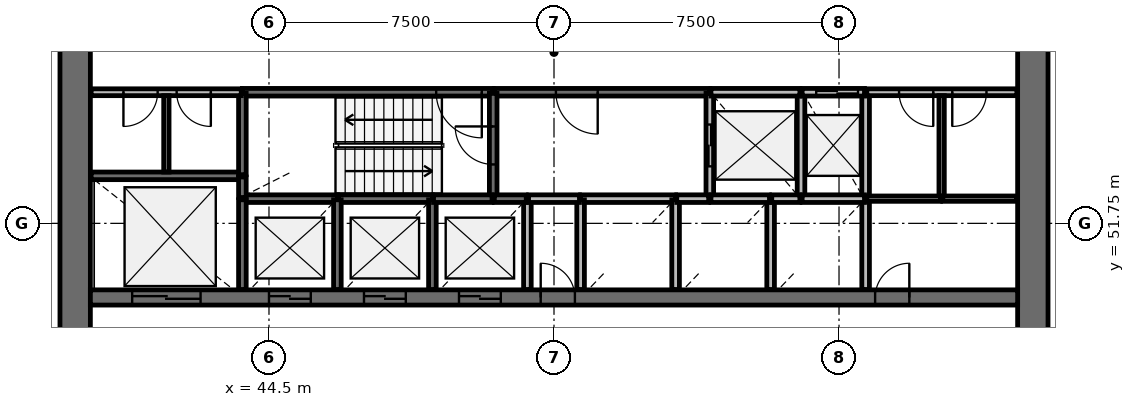
"""IFC4 building model, lengths in metres.
Left out: names, types, materials, properties, quantities, classifications, styles, units other than length and angle.
Written with IfcOpenShell. Run it as: python <this file> out.ifc"""

import sys

from ifc_helpers import new_model, si_unit, direction, frame, frame_2d, origin, place, context, subcontext, project, spatial, rectangle, extrude, source, transform, mapped, element, fill, save


model = new_model("IFC4")
c1 = context("Model", 3, precision=1e-05, world=origin(), true_north=direction((0.0, 1.0)))
c2 = subcontext(c1, "Body", "Model", "MODEL_VIEW")
j1 = project(units=[si_unit("LENGTHUNIT", "METRE"), si_unit("PLANEANGLEUNIT", "RADIAN")], contexts=[c1])
p1 = place(None, origin())
s1 = spatial("IfcSite", under=j1, at=p1, CompositionType="ELEMENT")
p2 = place(p1, origin())
s2 = spatial("IfcBuilding", under=s1, at=p2, CompositionType="ELEMENT")
p3 = place(p2, frame((0.0, 0.0, 108.5)))
s3 = spatial("IfcBuildingStorey", under=s2, at=p3, CompositionType="ELEMENT", Elevation=108.5)
p4 = place(p3, frame((64.6, 38.0, 0.0), z_axis=(0.0, 0.0, 1.0), x_axis=(0.0, 1.0, 0.0)))
e1 = element("IfcWall", 1, at=p4, inside=s3, PredefinedType="SHEAR", context=c2, shape_type="SweptSolid", body=[
    extrude(rectangle(XDim=20.0, YDim=0.8, at=frame_2d((10.0, 0.0))), origin(), (0.0, 0.0, 1.0), 4.1),
])
p5 = place(p4, frame((9.1, 0.0, 0.0)))
e2 = element("IfcOpeningElement", 2, at=p5, cuts=e1, PredefinedType="OPENING", context=c2, shape_type="SweptSolid", body=[
    extrude(rectangle(XDim=1.8, YDim=2.1, at=frame_2d((0.9, 1.05))), frame((0.0, 0.41, 0.0), z_axis=(0.0, -1.0, 0.0), x_axis=(1.0, 0.0, 0.0)), (0.0, 0.0, 1.0), 0.82),
])
p6 = place(p3, frame((39.4, 58.0, 0.0), z_axis=(0.0, 0.0, 1.0), x_axis=(0.0, -1.0, 0.0)))
e3 = element("IfcWall", 3, at=p6, inside=s3, PredefinedType="SHEAR", context=c2, shape_type="SweptSolid", body=[
    extrude(rectangle(XDim=20.0, YDim=0.8, at=frame_2d((10.0, 0.0))), origin(), (0.0, 0.0, 1.0), 4.1),
])
p7 = place(p6, frame((9.1, 0.0, 0.0)))
e4 = element("IfcOpeningElement", 4, at=p7, cuts=e3, PredefinedType="OPENING", context=c2, shape_type="SweptSolid", body=[
    extrude(rectangle(XDim=1.8, YDim=2.1, at=frame_2d((0.9, 1.05))), frame((0.0, 0.41, 0.0), z_axis=(0.0, -1.0, 0.0), x_axis=(1.0, 0.0, 0.0)), (0.0, 0.0, 1.0), 0.82),
])
p8 = place(p3, frame((39.8, 49.8, 0.0), z_axis=(0.0, 0.0, 1.0), x_axis=(1.0, 0.0, 0.0)))
e5 = element("IfcWall", 5, at=p8, inside=s3, PredefinedType="SHEAR", context=c2, shape_type="SweptSolid", body=[
    extrude(rectangle(XDim=24.4, YDim=0.4, at=frame_2d((12.2, 0.0))), origin(), (0.0, 0.0, 1.0), 4.1),
])
p9 = place(p8, frame((4.7, 0.0, 0.0)))
e6 = element("IfcOpeningElement", 6, at=p9, cuts=e5, PredefinedType="OPENING", context=c2, shape_type="SweptSolid", body=[
    extrude(rectangle(XDim=1.1, YDim=2.1, at=frame_2d((0.55, 1.05))), frame((0.0, 0.21, 0.0), z_axis=(0.0, -1.0, 0.0), x_axis=(1.0, 0.0, 0.0)), (0.0, 0.0, 1.0), 0.42),
])
p10 = place(p8, frame((7.2, 0.0, 0.0)))
e7 = element("IfcOpeningElement", 7, at=p10, cuts=e5, PredefinedType="OPENING", context=c2, shape_type="SweptSolid", body=[
    extrude(rectangle(XDim=1.1, YDim=2.1, at=frame_2d((0.55, 1.05))), frame((0.0, 0.21, 0.0), z_axis=(0.0, -1.0, 0.0), x_axis=(1.0, 0.0, 0.0)), (0.0, 0.0, 1.0), 0.42),
])
p11 = place(p8, frame((9.7, 0.0, 0.0)))
e8 = element("IfcOpeningElement", 8, at=p11, cuts=e5, PredefinedType="OPENING", context=c2, shape_type="SweptSolid", body=[
    extrude(rectangle(XDim=1.1, YDim=2.1, at=frame_2d((0.55, 1.05))), frame((0.0, 0.21, 0.0), z_axis=(0.0, -1.0, 0.0), x_axis=(1.0, 0.0, 0.0)), (0.0, 0.0, 1.0), 0.42),
])
p12 = place(p8, frame((1.1, 0.0, 0.0)))
e9 = element("IfcOpeningElement", 9, at=p12, cuts=e5, PredefinedType="OPENING", context=c2, shape_type="SweptSolid", body=[
    extrude(rectangle(XDim=1.8, YDim=2.4, at=frame_2d((0.9, 1.2))), frame((0.0, 0.21, 0.0), z_axis=(0.0, -1.0, 0.0), x_axis=(1.0, 0.0, 0.0)), (0.0, 0.0, 1.0), 0.42),
])
p13 = place(p8, frame((20.65, 0.0, 0.0)))
e10 = element("IfcOpeningElement", 10, at=p13, cuts=e5, PredefinedType="OPENING", context=c2, shape_type="SweptSolid", body=[
    extrude(rectangle(XDim=0.9, YDim=2.1, at=frame_2d((0.45, 1.05))), frame((0.0, 0.21, 0.0), z_axis=(0.0, -1.0, 0.0), x_axis=(1.0, 0.0, 0.0)), (0.0, 0.0, 1.0), 0.42),
])
p14 = place(p8, frame((11.85, 0.0, 0.0)))
e11 = element("IfcOpeningElement", 11, at=p14, cuts=e5, PredefinedType="OPENING", context=c2, shape_type="SweptSolid", body=[
    extrude(rectangle(XDim=0.9, YDim=2.1, at=frame_2d((0.45, 1.05))), frame((0.0, 0.21, 0.0), z_axis=(0.0, -1.0, 0.0), x_axis=(1.0, 0.0, 0.0)), (0.0, 0.0, 1.0), 0.42),
])
p15 = place(p3, frame((50.4, 55.2, 0.0), z_axis=(0.0, 0.0, 1.0), x_axis=(-1.0, 0.0, 0.0)))
e12 = element("IfcWall", 12, at=p15, inside=s3, PredefinedType="SOLIDWALL", context=c2, shape_type="SweptSolid", body=[
    extrude(rectangle(XDim=6.6, YDim=0.2, at=frame_2d((3.3, 0.0))), origin(), (0.0, 0.0, 1.0), 3.7),
])
p16 = place(p15, frame((0.3, 0.0, 0.0)))
e13 = element("IfcOpeningElement", 13, at=p16, cuts=e12, PredefinedType="OPENING", context=c2, shape_type="SweptSolid", body=[
    extrude(rectangle(XDim=1.2, YDim=2.1, at=frame_2d((0.6, 1.05))), frame((0.0, 0.11, 0.0), z_axis=(0.0, -1.0, 0.0), x_axis=(1.0, 0.0, 0.0)), (0.0, 0.0, 1.0), 0.22),
])
p17 = place(p3, frame((56.1, 55.2, 0.0), z_axis=(0.0, 0.0, 1.0), x_axis=(-1.0, 0.0, 0.0)))
e14 = element("IfcWall", 14, at=p17, inside=s3, PredefinedType="SOLIDWALL", context=c2, shape_type="SweptSolid", body=[
    extrude(rectangle(XDim=5.67, YDim=0.2, at=frame_2d((2.835, 0.0))), origin(), (0.0, 0.0, 1.0), 3.7),
])
p18 = place(p17, frame((2.95, 0.0, 0.0)))
e15 = element("IfcOpeningElement", 15, at=p18, cuts=e14, PredefinedType="OPENING", context=c2, shape_type="SweptSolid", body=[
    extrude(rectangle(XDim=1.1, YDim=2.1, at=frame_2d((0.55, 1.05))), frame((0.0, 0.11, 0.0), z_axis=(0.0, -1.0, 0.0), x_axis=(1.0, 0.0, 0.0)), (0.0, 0.0, 1.0), 0.22),
])
p19 = place(p3, frame((43.8, 53.0, 0.0), z_axis=(0.0, 0.0, 1.0), x_axis=(-1.0, 0.0, 0.0)))
e16 = element("IfcWall", 16, at=p19, inside=s3, PredefinedType="SOLIDWALL", context=c2, shape_type="SweptSolid", body=[
    extrude(rectangle(XDim=3.98, YDim=0.2, at=frame_2d((1.99, 0.0))), origin(), (0.0, 0.0, 1.0), 3.7),
])
p20 = place(p3, frame((50.4, 52.4, 0.0), z_axis=(0.0, 0.0, 1.0), x_axis=(0.0, 1.0, 0.0)))
e17 = element("IfcWall", 17, at=p20, inside=s3, PredefinedType="SOLIDWALL", context=c2, shape_type="SweptSolid", body=[
    extrude(rectangle(XDim=2.77, YDim=0.2, at=frame_2d((1.385, 0.0))), origin(), (0.0, 0.0, 1.0), 3.7),
])
p21 = place(p20, frame((0.9, 0.0, 0.0)))
e18 = element("IfcOpeningElement", 18, at=p21, cuts=e17, PredefinedType="OPENING", context=c2, shape_type="SweptSolid", body=[
    extrude(rectangle(XDim=1.0, YDim=2.1, at=frame_2d((0.5, 1.05))), frame((0.0, 0.11, 0.0), z_axis=(0.0, -1.0, 0.0), x_axis=(1.0, 0.0, 0.0)), (0.0, 0.0, 1.0), 0.22),
])
p22 = place(p3, frame((56.1, 55.17, 0.0), z_axis=(0.0, 0.0, 1.0), x_axis=(0.0, -1.0, 0.0)))
e19 = element("IfcWall", 19, at=p22, inside=s3, PredefinedType="SOLIDWALL", context=c2, shape_type="SweptSolid", body=[
    extrude(rectangle(XDim=2.77, YDim=0.2, at=frame_2d((1.385, 0.0))), origin(), (0.0, 0.0, 1.0), 3.7),
])
p23 = place(p22, frame((0.82, 0.0, 0.0)))
e20 = element("IfcOpeningElement", 20, at=p23, cuts=e19, PredefinedType="OPENING", context=c2, shape_type="SweptSolid", body=[
    extrude(rectangle(XDim=1.1, YDim=2.1, at=frame_2d((0.55, 1.05))), frame((0.0, 0.11, 0.0), z_axis=(0.0, -1.0, 0.0), x_axis=(1.0, 0.0, 0.0)), (0.0, 0.0, 1.0), 0.22),
])
for number, where, z_axis, x_axis in (
    (21, (58.5, 52.4, 0.0), (0.0, 0.0, 1.0), (0.0, 1.0, 0.0)),
    (22, (60.2, 52.4, 0.0), (0.0, 0.0, 1.0), (0.0, 1.0, 0.0)),
):
    element("IfcWall", number, at=place(p3, frame(where, z_axis=z_axis, x_axis=x_axis)), inside=s3, PredefinedType="SOLIDWALL", context=c2, shape_type="SweptSolid", body=[
        extrude(rectangle(XDim=2.8, YDim=0.2, at=frame_2d((1.4, 0.0))), origin(), (0.0, 0.0, 1.0), 3.7),
    ])
p24 = place(p3, frame((46.3, 52.4, 0.0), z_axis=(0.0, 0.0, 1.0), x_axis=(-1.0, 0.0, 0.0)))
e23 = element("IfcWall", 23, at=p24, inside=s3, PredefinedType="SOLIDWALL", context=c2, shape_type="SweptSolid", body=[
    extrude(rectangle(XDim=2.5, YDim=0.2, at=frame_2d((1.25, 0.0))), origin(), (0.0, 0.0, 1.0), 3.7),
])
p25 = place(p3, frame((48.8, 52.4, 0.0), z_axis=(0.0, 0.0, 1.0), x_axis=(-1.0, 0.0, 0.0)))
e24 = element("IfcWall", 24, at=p25, inside=s3, PredefinedType="SOLIDWALL", context=c2, shape_type="SweptSolid", body=[
    extrude(rectangle(XDim=2.47, YDim=0.2, at=frame_2d((1.235, 0.0))), origin(), (0.0, 0.0, 1.0), 3.7),
])
p26 = place(p3, frame((55.2, 52.4, 0.0), z_axis=(0.0, 0.0, 1.0), x_axis=(-1.0, 0.0, 0.0)))
e25 = element("IfcWall", 25, at=p26, inside=s3, PredefinedType="SOLIDWALL", context=c2, shape_type="SweptSolid", body=[
    extrude(rectangle(XDim=2.5, YDim=0.2, at=frame_2d((1.25, 0.0))), origin(), (0.0, 0.0, 1.0), 3.7),
])
p27 = place(p3, frame((58.47, 55.2, 0.0), z_axis=(0.0, 0.0, 1.0), x_axis=(-1.0, 0.0, 0.0)))
e26 = element("IfcWall", 26, at=p27, inside=s3, PredefinedType="SOLIDWALL", context=c2, shape_type="SweptSolid", body=[
    extrude(rectangle(XDim=2.34, YDim=0.2, at=frame_2d((1.17, 0.0))), origin(), (0.0, 0.0, 1.0), 3.7),
])
for number, where, z_axis, x_axis in (
    (27, (43.8, 52.37, 0.0), (0.0, 0.0, 1.0), (0.0, -1.0, 0.0)),
    (28, (46.3, 50.01, 0.0), (0.0, 0.0, 1.0), (0.0, 1.0, 0.0)),
    (29, (48.8, 50.01, 0.0), (0.0, 0.0, 1.0), (0.0, 1.0, 0.0)),
):
    element("IfcWall", number, at=place(p3, frame(where, z_axis=z_axis, x_axis=x_axis)), inside=s3, PredefinedType="SOLIDWALL", context=c2, shape_type="SweptSolid", body=[
        extrude(rectangle(XDim=2.36, YDim=0.2, at=frame_2d((1.18, 0.0))), origin(), (0.0, 0.0, 1.0), 3.7),
    ])
p28 = place(p3, frame((51.3, 50.01, 0.0), z_axis=(0.0, 0.0, 1.0), x_axis=(0.0, 1.0, 0.0)))
e30 = element("IfcWall", 30, at=p28, inside=s3, PredefinedType="SOLIDWALL", context=c2, shape_type="SweptSolid", body=[
    extrude(rectangle(XDim=2.39, YDim=0.2, at=frame_2d((1.195, 0.0))), origin(), (0.0, 0.0, 1.0), 3.7),
])
for number, where, z_axis, x_axis in (
    (31, (52.7, 52.37, 0.0), (0.0, 0.0, 1.0), (0.0, -1.0, 0.0)),
    (32, (55.2, 50.01, 0.0), (0.0, 0.0, 1.0), (0.0, 1.0, 0.0)),
):
    element("IfcWall", number, at=place(p3, frame(where, z_axis=z_axis, x_axis=x_axis)), inside=s3, PredefinedType="SOLIDWALL", context=c2, shape_type="SweptSolid", body=[
        extrude(rectangle(XDim=2.36, YDim=0.2, at=frame_2d((1.18, 0.0))), origin(), (0.0, 0.0, 1.0), 3.7),
    ])
p29 = place(p3, frame((57.7, 50.01, 0.0), z_axis=(0.0, 0.0, 1.0), x_axis=(0.0, 1.0, 0.0)))
e33 = element("IfcWall", 33, at=p29, inside=s3, PredefinedType="SOLIDWALL", context=c2, shape_type="SweptSolid", body=[
    extrude(rectangle(XDim=2.39, YDim=0.2, at=frame_2d((1.195, 0.0))), origin(), (0.0, 0.0, 1.0), 3.7),
])
p30 = place(p3, frame((60.2, 50.01, 0.0), z_axis=(0.0, 0.0, 1.0), x_axis=(0.0, 1.0, 0.0)))
e34 = element("IfcWall", 34, at=p30, inside=s3, PredefinedType="SOLIDWALL", context=c2, shape_type="SweptSolid", body=[
    extrude(rectangle(XDim=2.36, YDim=0.2, at=frame_2d((1.18, 0.0))), origin(), (0.0, 0.0, 1.0), 3.7),
])
p31 = place(p3, frame((43.8, 55.17, 0.0), z_axis=(0.0, 0.0, 1.0), x_axis=(0.0, -1.0, 0.0)))
e35 = element("IfcWall", 35, at=p31, inside=s3, PredefinedType="SOLIDWALL", context=c2, shape_type="SweptSolid", body=[
    extrude(rectangle(XDim=2.14, YDim=0.2, at=frame_2d((1.07, 0.0))), origin(), (0.0, 0.0, 1.0), 3.7),
])
p32 = place(p3, frame((60.17, 52.4, 0.0), z_axis=(0.0, 0.0, 1.0), x_axis=(-1.0, 0.0, 0.0)))
e36 = element("IfcWall", 36, at=p32, inside=s3, PredefinedType="SOLIDWALL", context=c2, shape_type="SweptSolid", body=[
    extrude(rectangle(XDim=1.64, YDim=0.2, at=frame_2d((0.82, 0.0))), origin(), (0.0, 0.0, 1.0), 3.7),
])
p33 = place(p3, frame((60.17, 55.2, 0.0), z_axis=(0.0, 0.0, 1.0), x_axis=(-1.0, 0.0, 0.0)))
e37 = element("IfcWall", 37, at=p33, inside=s3, PredefinedType="SOLIDWALL", context=c2, shape_type="SweptSolid", body=[
    extrude(rectangle(XDim=1.64, YDim=0.2, at=frame_2d((0.82, 0.0))), origin(), (0.0, 0.0, 1.0), 3.7),
])
p34 = place(p33, frame((0.17, 0.0, 0.0)))
e38 = element("IfcOpeningElement", 38, at=p34, cuts=e37, PredefinedType="OPENING", context=c2, shape_type="SweptSolid", body=[
    extrude(rectangle(XDim=1.1, YDim=2.1, at=frame_2d((0.55, 1.05))), frame((0.0, 0.11, 0.0), z_axis=(0.0, -1.0, 0.0), x_axis=(1.0, 0.0, 0.0)), (0.0, 0.0, 1.0), 0.22),
])
for number, where, z_axis, x_axis in (
    (39, (50.37, 52.4, 0.0), (0.0, 0.0, 1.0), (-1.0, 0.0, 0.0)),
    (40, (57.67, 52.4, 0.0), (0.0, 0.0, 1.0), (-1.0, 0.0, 0.0)),
):
    element("IfcWall", number, at=place(p3, frame(where, z_axis=z_axis, x_axis=x_axis)), inside=s3, PredefinedType="SOLIDWALL", context=c2, shape_type="SweptSolid", body=[
        extrude(rectangle(XDim=1.54, YDim=0.2, at=frame_2d((0.77, 0.0))), origin(), (0.0, 0.0, 1.0), 3.7),
    ])
p35 = place(p3, frame((51.33, 52.4, 0.0), z_axis=(0.0, 0.0, 1.0), x_axis=(1.0, 0.0, 0.0)))
e41 = element("IfcWall", 41, at=p35, inside=s3, PredefinedType="SOLIDWALL", context=c2, shape_type="SweptSolid", body=[
    extrude(rectangle(XDim=1.34, YDim=0.2, at=frame_2d((0.67, 0.0))), origin(), (0.0, 0.0, 1.0), 3.7),
])
for number, where, z_axis, x_axis in (
    (42, (51.27, 52.4, 0.0), (0.0, 0.0, 1.0), (-1.0, 0.0, 0.0)),
    (43, (56.07, 52.4, 0.0), (0.0, 0.0, 1.0), (-1.0, 0.0, 0.0)),
):
    element("IfcWall", number, at=place(p3, frame(where, z_axis=z_axis, x_axis=x_axis)), inside=s3, PredefinedType="SOLIDWALL", context=c2, shape_type="SweptSolid", body=[
        extrude(rectangle(XDim=0.84, YDim=0.2, at=frame_2d((0.42, 0.0))), origin(), (0.0, 0.0, 1.0), 3.7),
    ])
p36 = place(p3, frame((58.47, 52.4, 0.0), z_axis=(0.0, 0.0, 1.0), x_axis=(-1.0, 0.0, 0.0)))
e44 = element("IfcWall", 44, at=p36, inside=s3, PredefinedType="SOLIDWALL", context=c2, shape_type="SweptSolid", body=[
    extrude(rectangle(XDim=0.74, YDim=0.2, at=frame_2d((0.37, 0.0))), origin(), (0.0, 0.0, 1.0), 3.7),
])
p37 = place(p3, frame((43.8, 52.43, 0.0), z_axis=(0.0, 0.0, 1.0), x_axis=(0.0, 1.0, 0.0)))
e45 = element("IfcWall", 45, at=p37, inside=s3, PredefinedType="SOLIDWALL", context=c2, shape_type="SweptSolid", body=[
    extrude(rectangle(XDim=0.54, YDim=0.2, at=frame_2d((0.27, 0.0))), origin(), (0.0, 0.0, 1.0), 3.7),
])
p38 = place(p3, frame((64.18, 55.2, 0.0), z_axis=(0.0, 0.0, 1.0), x_axis=(-1.0, 0.0, 0.0)))
e46 = element("IfcWall", 46, at=p38, inside=s3, PredefinedType="PARTITIONING", context=c2, shape_type="SweptSolid", body=[
    extrude(rectangle(XDim=3.95, YDim=0.18, at=frame_2d((1.975, 0.0))), origin(), (0.0, 0.0, 1.0), 3.7),
])
p39 = place(p38, frame((2.2, 0.0, 0.0)))
e47 = element("IfcOpeningElement", 47, at=p39, cuts=e46, PredefinedType="OPENING", context=c2, shape_type="SweptSolid", body=[
    extrude(rectangle(XDim=0.9, YDim=2.1, at=frame_2d((0.45, 1.05))), frame((0.0, 0.1, 0.0), z_axis=(0.0, -1.0, 0.0), x_axis=(1.0, 0.0, 0.0)), (0.0, 0.0, 1.0), 0.2),
])
p40 = place(p38, frame((0.8, 0.0, 0.0)))
e48 = element("IfcOpeningElement", 48, at=p40, cuts=e46, PredefinedType="OPENING", context=c2, shape_type="SweptSolid", body=[
    extrude(rectangle(XDim=0.9, YDim=2.1, at=frame_2d((0.45, 1.05))), frame((0.0, 0.1, 0.0), z_axis=(0.0, -1.0, 0.0), x_axis=(1.0, 0.0, 0.0)), (0.0, 0.0, 1.0), 0.2),
])
p41 = place(p3, frame((43.77, 55.2, 0.0), z_axis=(0.0, 0.0, 1.0), x_axis=(-1.0, 0.0, 0.0)))
e49 = element("IfcWall", 49, at=p41, inside=s3, PredefinedType="PARTITIONING", context=c2, shape_type="SweptSolid", body=[
    extrude(rectangle(XDim=3.95, YDim=0.18, at=frame_2d((1.975, 0.0))), origin(), (0.0, 0.0, 1.0), 3.7),
])
p42 = place(p41, frame((2.2, 0.0, 0.0)))
e50 = element("IfcOpeningElement", 50, at=p42, cuts=e49, PredefinedType="OPENING", context=c2, shape_type="SweptSolid", body=[
    extrude(rectangle(XDim=0.9, YDim=2.1, at=frame_2d((0.45, 1.05))), frame((0.0, 0.1, 0.0), z_axis=(0.0, -1.0, 0.0), x_axis=(1.0, 0.0, 0.0)), (0.0, 0.0, 1.0), 0.2),
])
p43 = place(p41, frame((0.8, 0.0, 0.0)))
e51 = element("IfcOpeningElement", 51, at=p43, cuts=e49, PredefinedType="OPENING", context=c2, shape_type="SweptSolid", body=[
    extrude(rectangle(XDim=0.9, YDim=2.1, at=frame_2d((0.45, 1.05))), frame((0.0, 0.1, 0.0), z_axis=(0.0, -1.0, 0.0), x_axis=(1.0, 0.0, 0.0)), (0.0, 0.0, 1.0), 0.2),
])
p44 = place(p3, frame((62.2, 52.4, 0.0), z_axis=(0.0, 0.0, 1.0), x_axis=(0.0, 1.0, 0.0)))
e52 = element("IfcWall", 52, at=p44, inside=s3, PredefinedType="PARTITIONING", context=c2, shape_type="SweptSolid", body=[
    extrude(rectangle(XDim=2.71, YDim=0.14, at=frame_2d((1.355, 0.0))), origin(), (0.0, 0.0, 1.0), 2.9),
])
p45 = place(p3, frame((41.8, 53.1, 0.0), z_axis=(0.0, 0.0, 1.0), x_axis=(0.0, 1.0, 0.0)))
e53 = element("IfcWall", 53, at=p45, inside=s3, PredefinedType="PARTITIONING", context=c2, shape_type="SweptSolid", body=[
    extrude(rectangle(XDim=2.01, YDim=0.14, at=frame_2d((1.005, 0.0))), origin(), (0.0, 0.0, 1.0), 2.9),
])
p46 = place(p3, frame((62.17, 52.4, 0.0), z_axis=(0.0, 0.0, 1.0), x_axis=(-1.0, 0.0, 0.0)))
e54 = element("IfcWall", 54, at=p46, inside=s3, PredefinedType="PARTITIONING", context=c2, shape_type="SweptSolid", body=[
    extrude(rectangle(XDim=1.94, YDim=0.14, at=frame_2d((0.97, 0.0))), origin(), (0.0, 0.0, 1.0), 2.9),
])
p47 = place(p3, frame((64.18, 52.4, 0.0), z_axis=(0.0, 0.0, 1.0), x_axis=(-1.0, 0.0, 0.0)))
e55 = element("IfcWall", 55, at=p47, inside=s3, PredefinedType="PARTITIONING", context=c2, shape_type="SweptSolid", body=[
    extrude(rectangle(XDim=1.95, YDim=0.14, at=frame_2d((0.975, 0.0))), origin(), (0.0, 0.0, 1.0), 2.9),
])
m1 = source(origin(), c2, "Body", "SweptSolid", [
    extrude(rectangle(XDim=1.1, YDim=2.1, at=frame_2d((0.55, 1.05))), frame((0.0, 0.025, 0.0), z_axis=(0.0, -1.0, 0.0), x_axis=(1.0, 0.0, 0.0)), (0.0, 0.0, 1.0), 0.05),
])
p48 = place(p9, origin())
e56 = element("IfcDoor", 56, at=p48, inside=s3, OperationType="DOUBLE_DOOR_SLIDING", PredefinedType="USERDEFINED", context=c2, shape_type="MappedRepresentation", body=[
    mapped(m1, transform((0.0, 0.0, 0.0), scale=1.0)),
])
fill(e6, e56)
p49 = place(p10, origin())
e57 = element("IfcDoor", 57, at=p49, inside=s3, OperationType="DOUBLE_DOOR_SLIDING", PredefinedType="USERDEFINED", context=c2, shape_type="MappedRepresentation", body=[
    mapped(m1, transform((0.0, 0.0, 0.0), scale=1.0)),
])
fill(e7, e57)
p50 = place(p11, origin())
e58 = element("IfcDoor", 58, at=p50, inside=s3, OperationType="DOUBLE_DOOR_SLIDING", PredefinedType="USERDEFINED", context=c2, shape_type="MappedRepresentation", body=[
    mapped(m1, transform((0.0, 0.0, 0.0), scale=1.0)),
])
fill(e8, e58)
p51 = place(p23, origin())
e59 = element("IfcDoor", 59, at=p51, inside=s3, OperationType="DOUBLE_DOOR_SLIDING", PredefinedType="USERDEFINED", context=c2, shape_type="MappedRepresentation", body=[
    mapped(m1, transform((0.0, 0.0, 0.0), scale=1.0)),
])
fill(e20, e59)
p52 = place(p34, origin())
e60 = element("IfcDoor", 60, at=p52, inside=s3, OperationType="DOUBLE_DOOR_SLIDING", PredefinedType="USERDEFINED", context=c2, shape_type="MappedRepresentation", body=[
    mapped(m1, transform((0.0, 0.0, 0.0), scale=1.0)),
])
fill(e38, e60)
m2 = source(origin(), c2, "Body", "SweptSolid", [
    extrude(rectangle(XDim=1.8, YDim=2.4, at=frame_2d((0.9, 1.2))), frame((0.0, 0.025, 0.0), z_axis=(0.0, -1.0, 0.0), x_axis=(1.0, 0.0, 0.0)), (0.0, 0.0, 1.0), 0.05),
])
p53 = place(p12, origin())
e61 = element("IfcDoor", 61, at=p53, inside=s3, OperationType="DOUBLE_DOOR_SLIDING", PredefinedType="USERDEFINED", context=c2, shape_type="MappedRepresentation", body=[
    mapped(m2, transform((0.0, 0.0, 0.0), scale=1.0)),
])
fill(e9, e61)
m3 = source(origin(), c2, "Body", "SweptSolid", [
    extrude(rectangle(XDim=1.2, YDim=2.1, at=frame_2d((0.6, 1.05))), frame((0.0, 0.025, 0.0), z_axis=(0.0, -1.0, 0.0), x_axis=(1.0, 0.0, 0.0)), (0.0, 0.0, 1.0), 0.05),
])
p54 = place(p16, origin())
e62 = element("IfcDoor", 62, at=p54, inside=s3, OperationType="SINGLE_SWING_LEFT", PredefinedType="DOOR", context=c2, shape_type="MappedRepresentation", body=[
    mapped(m3, transform((0.0, 0.0, 0.0), scale=1.0)),
])
fill(e13, e62)
m4 = source(origin(), c2, "Body", "SweptSolid", [
    extrude(rectangle(XDim=1.0, YDim=2.1, at=frame_2d((0.5, 1.05))), frame((0.0, 0.025, 0.0), z_axis=(0.0, -1.0, 0.0), x_axis=(1.0, 0.0, 0.0)), (0.0, 0.0, 1.0), 0.05),
])
p55 = place(p21, origin())
e63 = element("IfcDoor", 63, at=p55, inside=s3, OperationType="SINGLE_SWING_RIGHT", PredefinedType="DOOR", context=c2, shape_type="MappedRepresentation", body=[
    mapped(m4, transform((0.0, 0.0, 0.0), scale=1.0)),
])
fill(e18, e63)
m5 = source(origin(), c2, "Body", "SweptSolid", [
    extrude(rectangle(XDim=1.1, YDim=2.1, at=frame_2d((0.55, 1.05))), frame((0.0, 0.025, 0.0), z_axis=(0.0, -1.0, 0.0), x_axis=(1.0, 0.0, 0.0)), (0.0, 0.0, 1.0), 0.05),
])
p56 = place(p18, origin())
e64 = element("IfcDoor", 64, at=p56, inside=s3, OperationType="SINGLE_SWING_LEFT", PredefinedType="DOOR", context=c2, shape_type="MappedRepresentation", body=[
    mapped(m5, transform((0.0, 0.0, 0.0), scale=1.0)),
])
fill(e15, e64)
m6 = source(origin(), c2, "Body", "SweptSolid", [
    extrude(rectangle(XDim=0.9, YDim=2.1, at=frame_2d((0.45, 1.05))), frame((0.0, 0.025, 0.0), z_axis=(0.0, -1.0, 0.0), x_axis=(1.0, 0.0, 0.0)), (0.0, 0.0, 1.0), 0.05),
])
p57 = place(p42, origin())
e65 = element("IfcDoor", 65, at=p57, inside=s3, OperationType="SINGLE_SWING_RIGHT", PredefinedType="DOOR", context=c2, shape_type="MappedRepresentation", body=[
    mapped(m6, transform((0.0, 0.0, 0.0), scale=1.0)),
])
fill(e50, e65)
p58 = place(p43, origin())
e66 = element("IfcDoor", 66, at=p58, inside=s3, OperationType="SINGLE_SWING_LEFT", PredefinedType="DOOR", context=c2, shape_type="MappedRepresentation", body=[
    mapped(m6, transform((0.0, 0.0, 0.0), scale=1.0)),
])
fill(e51, e66)
p59 = place(p13, origin())
e67 = element("IfcDoor", 67, at=p59, inside=s3, OperationType="SINGLE_SWING_RIGHT", PredefinedType="DOOR", context=c2, shape_type="MappedRepresentation", body=[
    mapped(m6, transform((0.0, 0.0, 0.0), scale=1.0)),
])
fill(e10, e67)
p60 = place(p39, origin())
e68 = element("IfcDoor", 68, at=p60, inside=s3, OperationType="SINGLE_SWING_LEFT", PredefinedType="DOOR", context=c2, shape_type="MappedRepresentation", body=[
    mapped(m6, transform((0.0, 0.0, 0.0), scale=1.0)),
])
fill(e47, e68)
p61 = place(p40, origin())
e69 = element("IfcDoor", 69, at=p61, inside=s3, OperationType="SINGLE_SWING_RIGHT", PredefinedType="DOOR", context=c2, shape_type="MappedRepresentation", body=[
    mapped(m6, transform((0.0, 0.0, 0.0), scale=1.0)),
])
fill(e48, e69)
p62 = place(p14, origin())
e70 = element("IfcDoor", 70, at=p62, inside=s3, OperationType="SINGLE_SWING_LEFT", PredefinedType="DOOR", context=c2, shape_type="MappedRepresentation", body=[
    mapped(m6, transform((0.0, 0.0, 0.0), scale=1.0)),
])
fill(e11, e70)
save(model, sys.argv[1])
